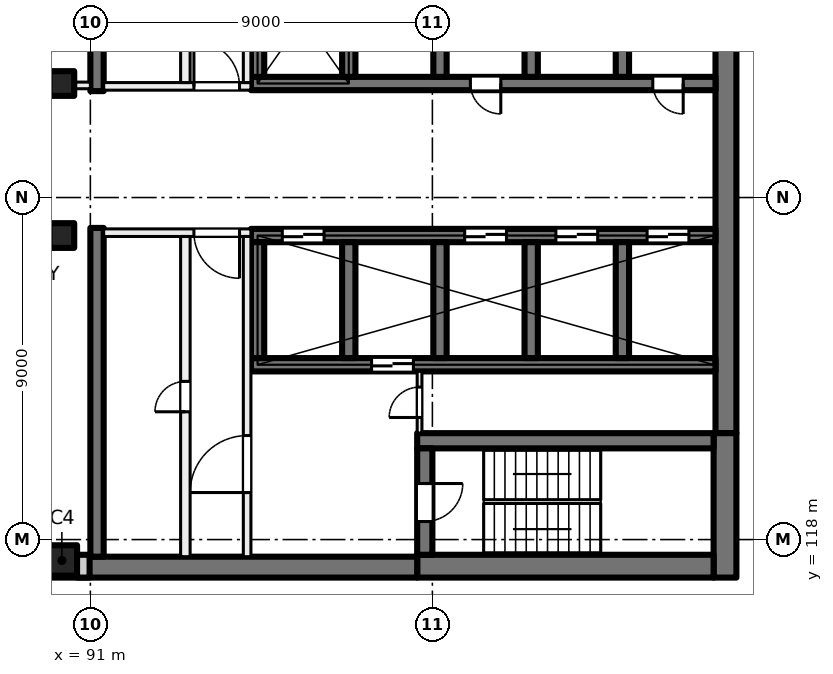
"""IFC4 building model, lengths in metres.
Left out: names, types, materials, properties, quantities, classifications, styles, units other than length and angle.
Written with IfcOpenShell. Run it as: python <this file> out.ifc"""

import sys

from ifc_helpers import new_model, si_unit, direction, frame, frame_2d, origin, origin_2d, place, context, subcontext, project, spatial, rectangle, extrude, element, fill, save


model = new_model("IFC4")
c1 = context("Model", 3, precision=1e-05, world=origin(), true_north=direction((0.0, 1.0)))
c2 = subcontext(c1, "Body", "Model", "MODEL_VIEW")
j1 = project(units=[si_unit("LENGTHUNIT", "METRE"), si_unit("PLANEANGLEUNIT", "RADIAN")], contexts=[c1])
p1 = place(None, origin())
s1 = spatial("IfcSite", under=j1, at=p1, CompositionType="ELEMENT")
p2 = place(p1, origin())
s2 = spatial("IfcBuilding", under=s1, at=p2, CompositionType="ELEMENT")
p3 = place(p2, frame((0.0, 0.0, 158.5)))
s3 = spatial("IfcBuildingStorey", under=s2, at=p3, CompositionType="ELEMENT", Elevation=158.5)
for number, where, z_axis, x_axis in (
    (1, (90.25, 130.0, 0.0), (0.0, 0.0, 1.0), (1.0, 0.0, 0.0)),
    (2, (90.25, 126.0, 0.0), (0.0, 0.0, 1.0), (1.0, 0.0, 0.0)),
):
    element("IfcColumn", number, at=place(p3, frame(where, z_axis=z_axis, x_axis=x_axis)), inside=s3, PredefinedType="COLUMN", context=c2, shape_type="SweptSolid", body=[
        extrude(rectangle(XDim=0.65, YDim=0.65, at=origin_2d()), origin(), (0.0, 0.0, 1.0), 4.0),
    ])
p4 = place(p3, frame((90.25, 117.45, 0.0), z_axis=(0.0, 0.0, 1.0), x_axis=(1.0, 0.0, 0.0)))
e3 = element("IfcColumn", 3, at=p4, inside=s3, PredefinedType="COLUMN", context=c2, shape_type="SweptSolid", body=[
    extrude(rectangle(XDim=0.8, YDim=0.8, at=origin_2d()), origin(), (0.0, 0.0, 1.0), 4.0),
])
p5 = place(p3, frame((107.725, 135.2, 0.0), z_axis=(0.0, 0.0, 1.0), x_axis=(0.0, -1.0, 0.0)))
e4 = element("IfcWall", 4, at=p5, inside=s3, PredefinedType="SHEAR", context=c2, shape_type="SweptSolid", body=[
    extrude(rectangle(XDim=14.4, YDim=0.55, at=frame_2d((7.2, 0.0))), origin(), (0.0, 0.0, 1.0), 4.0),
])
p6 = place(p3, frame((107.7, 120.8, 0.0), z_axis=(0.0, 0.0, 1.0), x_axis=(0.0, -1.0, 0.0)))
e5 = element("IfcWall", 5, at=p6, inside=s3, PredefinedType="SHEAR", context=c2, shape_type="SweptSolid", body=[
    extrude(rectangle(XDim=3.8, YDim=0.6, at=frame_2d((1.9, 0.0))), origin(), (0.0, 0.0, 1.0), 4.0),
])
p7 = place(p3, frame((107.4, 117.3, 0.0), z_axis=(0.0, 0.0, 1.0), x_axis=(-1.0, 0.0, 0.0)))
e6 = element("IfcWall", 6, at=p7, inside=s3, PredefinedType="SHEAR", context=c2, shape_type="SweptSolid", body=[
    extrude(rectangle(XDim=7.8, YDim=0.6, at=frame_2d((3.9, 0.0))), origin(), (0.0, 0.0, 1.0), 4.0),
])
p8 = place(p3, frame((99.6, 117.275, 0.0), z_axis=(0.0, 0.0, 1.0), x_axis=(-1.0, 0.0, 0.0)))
e7 = element("IfcWall", 7, at=p8, inside=s3, PredefinedType="SHEAR", context=c2, shape_type="SweptSolid", body=[
    extrude(rectangle(XDim=8.95, YDim=0.55, at=frame_2d((4.475, 0.0))), origin(), (0.0, 0.0, 1.0), 4.0),
])
p9 = place(p3, frame((107.4, 120.6, 0.0), z_axis=(0.0, 0.0, 1.0), x_axis=(-1.0, 0.0, 0.0)))
e8 = element("IfcWall", 8, at=p9, inside=s3, PredefinedType="SHEAR", context=c2, shape_type="SweptSolid", body=[
    extrude(rectangle(XDim=7.8, YDim=0.4, at=frame_2d((3.9, 0.0))), origin(), (0.0, 0.0, 1.0), 4.0),
])
p10 = place(p3, frame((99.8, 120.4, 0.0), z_axis=(0.0, 0.0, 1.0), x_axis=(0.0, -1.0, 0.0)))
e9 = element("IfcWall", 9, at=p10, inside=s3, PredefinedType="SHEAR", context=c2, shape_type="SweptSolid", body=[
    extrude(rectangle(XDim=2.8, YDim=0.4, at=frame_2d((1.4, 0.0))), origin(), (0.0, 0.0, 1.0), 4.0),
])
p11 = place(p10, frame((0.925, 0.0, 0.0)))
e10 = element("IfcOpeningElement", 10, at=p11, cuts=e9, PredefinedType="OPENING", context=c2, shape_type="SweptSolid", body=[
    extrude(rectangle(XDim=1.0, YDim=2.1, at=frame_2d((0.5, 1.05))), frame((0.0, 0.21, 0.0), z_axis=(0.0, -1.0, 0.0), x_axis=(1.0, 0.0, 0.0)), (0.0, 0.0, 1.0), 0.42),
])
p12 = place(p3, frame((107.45, 130.0, 0.0), z_axis=(0.0, 0.0, 1.0), x_axis=(-1.0, 0.0, 0.0)))
e11 = element("IfcWall", 11, at=p12, inside=s3, PredefinedType="SHEAR", context=c2, shape_type="SweptSolid", body=[
    extrude(rectangle(XDim=12.225, YDim=0.35, at=frame_2d((6.112, 0.0))), origin(), (0.0, 0.0, 1.0), 4.0),
])
p13 = place(p12, frame((0.85, 0.0, 0.0)))
e12 = element("IfcOpeningElement", 12, at=p13, cuts=e11, PredefinedType="OPENING", context=c2, shape_type="SweptSolid", body=[
    extrude(rectangle(XDim=0.8, YDim=2.1, at=frame_2d((0.4, 1.05))), frame((0.0, 0.185, 0.0), z_axis=(0.0, -1.0, 0.0), x_axis=(1.0, 0.0, 0.0)), (0.0, 0.0, 1.0), 0.37),
])
p14 = place(p12, frame((5.65, 0.0, 0.0)))
e13 = element("IfcOpeningElement", 13, at=p14, cuts=e11, PredefinedType="OPENING", context=c2, shape_type="SweptSolid", body=[
    extrude(rectangle(XDim=0.8, YDim=2.1, at=frame_2d((0.4, 1.05))), frame((0.0, 0.185, 0.0), z_axis=(0.0, -1.0, 0.0), x_axis=(1.0, 0.0, 0.0)), (0.0, 0.0, 1.0), 0.37),
])
for number, where, z_axis, x_axis in (
    (14, (105.0, 133.225, 0.0), (0.0, 0.0, 1.0), (0.0, -1.0, 0.0)),
    (15, (102.6, 133.225, 0.0), (0.0, 0.0, 1.0), (0.0, -1.0, 0.0)),
    (16, (100.2, 133.225, 0.0), (0.0, 0.0, 1.0), (0.0, -1.0, 0.0)),
    (17, (97.8, 133.225, 0.0), (0.0, 0.0, 1.0), (0.0, -1.0, 0.0)),
    (18, (95.4, 133.225, 0.0), (0.0, 0.0, 1.0), (0.0, -1.0, 0.0)),
):
    element("IfcWall", number, at=place(p3, frame(where, z_axis=z_axis, x_axis=x_axis)), inside=s3, PredefinedType="SHEAR", context=c2, shape_type="SweptSolid", body=[
        extrude(rectangle(XDim=3.05, YDim=0.35, at=frame_2d((1.525, 0.0))), origin(), (0.0, 0.0, 1.0), 4.0),
    ])
p15 = place(p3, frame((107.45, 126.0, 0.0), z_axis=(0.0, 0.0, 1.0), x_axis=(-1.0, 0.0, 0.0)))
e19 = element("IfcWall", 19, at=p15, inside=s3, PredefinedType="SHEAR", context=c2, shape_type="SweptSolid", body=[
    extrude(rectangle(XDim=12.225, YDim=0.35, at=frame_2d((6.112, 0.0))), origin(), (0.0, 0.0, 1.0), 4.0),
])
p16 = place(p15, frame((0.7, 0.0, 0.0)))
e20 = element("IfcOpeningElement", 20, at=p16, cuts=e19, PredefinedType="OPENING", context=c2, shape_type="SweptSolid", body=[
    extrude(rectangle(XDim=1.1, YDim=2.1, at=frame_2d((0.55, 1.05))), frame((0.0, 0.185, 0.0), z_axis=(0.0, -1.0, 0.0), x_axis=(1.0, 0.0, 0.0)), (0.0, 0.0, 1.0), 0.37),
])
p17 = place(p15, frame((3.1, 0.0, 0.0)))
e21 = element("IfcOpeningElement", 21, at=p17, cuts=e19, PredefinedType="OPENING", context=c2, shape_type="SweptSolid", body=[
    extrude(rectangle(XDim=1.1, YDim=2.1, at=frame_2d((0.55, 1.05))), frame((0.0, 0.185, 0.0), z_axis=(0.0, -1.0, 0.0), x_axis=(1.0, 0.0, 0.0)), (0.0, 0.0, 1.0), 0.37),
])
p18 = place(p15, frame((5.5, 0.0, 0.0)))
e22 = element("IfcOpeningElement", 22, at=p18, cuts=e19, PredefinedType="OPENING", context=c2, shape_type="SweptSolid", body=[
    extrude(rectangle(XDim=1.1, YDim=2.1, at=frame_2d((0.55, 1.05))), frame((0.0, 0.185, 0.0), z_axis=(0.0, -1.0, 0.0), x_axis=(1.0, 0.0, 0.0)), (0.0, 0.0, 1.0), 0.37),
])
p19 = place(p15, frame((10.3, 0.0, 0.0)))
e23 = element("IfcOpeningElement", 23, at=p19, cuts=e19, PredefinedType="OPENING", context=c2, shape_type="SweptSolid", body=[
    extrude(rectangle(XDim=1.1, YDim=2.1, at=frame_2d((0.55, 1.05))), frame((0.0, 0.185, 0.0), z_axis=(0.0, -1.0, 0.0), x_axis=(1.0, 0.0, 0.0)), (0.0, 0.0, 1.0), 0.37),
])
p20 = place(p3, frame((107.45, 122.6, 0.0), z_axis=(0.0, 0.0, 1.0), x_axis=(-1.0, 0.0, 0.0)))
e24 = element("IfcWall", 24, at=p20, inside=s3, PredefinedType="SHEAR", context=c2, shape_type="SweptSolid", body=[
    extrude(rectangle(XDim=12.225, YDim=0.35, at=frame_2d((6.112, 0.0))), origin(), (0.0, 0.0, 1.0), 4.0),
])
p21 = place(p20, frame((7.95, 0.0, 0.0)))
e25 = element("IfcOpeningElement", 25, at=p21, cuts=e24, PredefinedType="OPENING", context=c2, shape_type="SweptSolid", body=[
    extrude(rectangle(XDim=1.1, YDim=2.1, at=frame_2d((0.55, 1.05))), frame((0.0, 0.185, 0.0), z_axis=(0.0, -1.0, 0.0), x_axis=(1.0, 0.0, 0.0)), (0.0, 0.0, 1.0), 0.37),
])
for number, where, z_axis, x_axis in (
    (26, (105.0, 125.825, 0.0), (0.0, 0.0, 1.0), (0.0, -1.0, 0.0)),
    (27, (102.6, 125.825, 0.0), (0.0, 0.0, 1.0), (0.0, -1.0, 0.0)),
    (28, (100.2, 125.825, 0.0), (0.0, 0.0, 1.0), (0.0, -1.0, 0.0)),
    (29, (97.8, 125.825, 0.0), (0.0, 0.0, 1.0), (0.0, -1.0, 0.0)),
    (30, (95.4, 125.825, 0.0), (0.0, 0.0, 1.0), (0.0, -1.0, 0.0)),
):
    element("IfcWall", number, at=place(p3, frame(where, z_axis=z_axis, x_axis=x_axis)), inside=s3, PredefinedType="SHEAR", context=c2, shape_type="SweptSolid", body=[
        extrude(rectangle(XDim=3.05, YDim=0.35, at=frame_2d((1.525, 0.0))), origin(), (0.0, 0.0, 1.0), 4.0),
    ])
for number, where, z_axis, x_axis in (
    (31, (91.175, 138.45, 0.0), (0.0, 0.0, 1.0), (0.0, -1.0, 0.0)),
    (32, (91.175, 126.2, 0.0), (0.0, 0.0, 1.0), (0.0, -1.0, 0.0)),
):
    element("IfcWall", number, at=place(p3, frame(where, z_axis=z_axis, x_axis=x_axis)), inside=s3, PredefinedType="SHEAR", context=c2, shape_type="SweptSolid", body=[
        extrude(rectangle(XDim=8.65, YDim=0.35, at=frame_2d((4.325, 0.0))), origin(), (0.0, 0.0, 1.0), 4.0),
    ])
p22 = place(p3, frame((90.98, 117.3, 0.0), z_axis=(0.0, 0.0, 1.0), x_axis=(-1.0, 0.0, 0.0)))
e33 = element("IfcWall", 33, at=p22, inside=s3, PredefinedType="SOLIDWALL", context=c2, shape_type="SweptSolid", body=[
    extrude(rectangle(XDim=33.745, YDim=0.6, at=frame_2d((16.873, 0.0))), origin(), (0.0, 0.0, 1.0), 3.625),
])
p23 = place(p22, frame((1.48, 0.0, 0.9)))
e34 = element("IfcOpeningElement", 34, at=p23, cuts=e33, PredefinedType="OPENING", context=c2, shape_type="SweptSolid", body=[
    extrude(rectangle(XDim=3.0, YDim=2.4, at=frame_2d((1.5, 1.2))), frame((0.0, 0.31, 0.0), z_axis=(0.0, -1.0, 0.0), x_axis=(1.0, 0.0, 0.0)), (0.0, 0.0, 1.0), 0.62),
])
p24 = place(p22, frame((5.98, 0.0, 0.9)))
e35 = element("IfcOpeningElement", 35, at=p24, cuts=e33, PredefinedType="OPENING", context=c2, shape_type="SweptSolid", body=[
    extrude(rectangle(XDim=3.0, YDim=2.4, at=frame_2d((1.5, 1.2))), frame((0.0, 0.31, 0.0), z_axis=(0.0, -1.0, 0.0), x_axis=(1.0, 0.0, 0.0)), (0.0, 0.0, 1.0), 0.62),
])
p25 = place(p22, frame((10.48, 0.0, 0.9)))
e36 = element("IfcOpeningElement", 36, at=p25, cuts=e33, PredefinedType="OPENING", context=c2, shape_type="SweptSolid", body=[
    extrude(rectangle(XDim=3.0, YDim=2.4, at=frame_2d((1.5, 1.2))), frame((0.0, 0.31, 0.0), z_axis=(0.0, -1.0, 0.0), x_axis=(1.0, 0.0, 0.0)), (0.0, 0.0, 1.0), 0.62),
])
p26 = place(p22, frame((14.98, 0.0, 0.9)))
e37 = element("IfcOpeningElement", 37, at=p26, cuts=e33, PredefinedType="OPENING", context=c2, shape_type="SweptSolid", body=[
    extrude(rectangle(XDim=3.0, YDim=2.4, at=frame_2d((1.5, 1.2))), frame((0.0, 0.31, 0.0), z_axis=(0.0, -1.0, 0.0), x_axis=(1.0, 0.0, 0.0)), (0.0, 0.0, 1.0), 0.62),
])
p27 = place(p22, frame((19.48, 0.0, 0.9)))
e38 = element("IfcOpeningElement", 38, at=p27, cuts=e33, PredefinedType="OPENING", context=c2, shape_type="SweptSolid", body=[
    extrude(rectangle(XDim=3.0, YDim=2.4, at=frame_2d((1.5, 1.2))), frame((0.0, 0.31, 0.0), z_axis=(0.0, -1.0, 0.0), x_axis=(1.0, 0.0, 0.0)), (0.0, 0.0, 1.0), 0.62),
])
p28 = place(p22, frame((23.98, 0.0, 0.9)))
e39 = element("IfcOpeningElement", 39, at=p28, cuts=e33, PredefinedType="OPENING", context=c2, shape_type="SweptSolid", body=[
    extrude(rectangle(XDim=3.0, YDim=2.4, at=frame_2d((1.5, 1.2))), frame((0.0, 0.31, 0.0), z_axis=(0.0, -1.0, 0.0), x_axis=(1.0, 0.0, 0.0)), (0.0, 0.0, 1.0), 0.62),
])
p29 = place(p22, frame((28.48, 0.0, 0.9)))
e40 = element("IfcOpeningElement", 40, at=p29, cuts=e33, PredefinedType="OPENING", context=c2, shape_type="SweptSolid", body=[
    extrude(rectangle(XDim=3.0, YDim=2.4, at=frame_2d((1.5, 1.2))), frame((0.0, 0.31, 0.0), z_axis=(0.0, -1.0, 0.0), x_axis=(1.0, 0.0, 0.0)), (0.0, 0.0, 1.0), 0.62),
])
p30 = place(p3, frame((95.225, 126.075, 0.0), z_axis=(0.0, 0.0, 1.0), x_axis=(-1.0, 0.0, 0.0)))
e41 = element("IfcWall", 41, at=p30, inside=s3, PredefinedType="PARTITIONING", context=c2, shape_type="SweptSolid", body=[
    extrude(rectangle(XDim=3.875, YDim=0.2, at=frame_2d((1.938, 0.0))), origin(), (0.0, 0.0, 1.0), 3.625),
])
p31 = place(p30, frame((0.3, 0.0, 0.0)))
e42 = element("IfcOpeningElement", 42, at=p31, cuts=e41, PredefinedType="OPENING", context=c2, shape_type="SweptSolid", body=[
    extrude(rectangle(XDim=1.2, YDim=2.1, at=frame_2d((0.6, 1.05))), frame((0.0, 0.11, 0.0), z_axis=(0.0, -1.0, 0.0), x_axis=(1.0, 0.0, 0.0)), (0.0, 0.0, 1.0), 0.22),
])
p32 = place(p3, frame((95.125, 117.55, 0.0), z_axis=(0.0, 0.0, 1.0), x_axis=(0.0, 1.0, 0.0)))
e43 = element("IfcWall", 43, at=p32, inside=s3, PredefinedType="PARTITIONING", context=c2, shape_type="SweptSolid", body=[
    extrude(rectangle(XDim=8.425, YDim=0.2, at=frame_2d((4.212, 0.0))), origin(), (0.0, 0.0, 1.0), 3.625),
])
p33 = place(p32, frame((1.688, 0.0, 0.0)))
e44 = element("IfcOpeningElement", 44, at=p33, cuts=e43, PredefinedType="OPENING", context=c2, shape_type="SweptSolid", body=[
    extrude(rectangle(XDim=1.5, YDim=2.1, at=frame_2d((0.75, 1.05))), frame((0.0, 0.11, 0.0), z_axis=(0.0, -1.0, 0.0), x_axis=(1.0, 0.0, 0.0)), (0.0, 0.0, 1.0), 0.22),
])
p34 = place(p3, frame((93.5, 117.55, 0.0), z_axis=(0.0, 0.0, 1.0), x_axis=(0.0, 1.0, 0.0)))
e45 = element("IfcWall", 45, at=p34, inside=s3, PredefinedType="PARTITIONING", context=c2, shape_type="SweptSolid", body=[
    extrude(rectangle(XDim=8.425, YDim=0.25, at=frame_2d((4.212, 0.0))), origin(), (0.0, 0.0, 1.0), 3.625),
])
p35 = place(p34, frame((3.812, 0.0, 0.0)))
e46 = element("IfcOpeningElement", 46, at=p35, cuts=e45, PredefinedType="OPENING", context=c2, shape_type="SweptSolid", body=[
    extrude(rectangle(XDim=0.8, YDim=2.1, at=frame_2d((0.4, 1.05))), frame((0.0, 0.135, 0.0), z_axis=(0.0, -1.0, 0.0), x_axis=(1.0, 0.0, 0.0)), (0.0, 0.0, 1.0), 0.27),
])
p36 = place(p3, frame((99.663, 120.8, 0.0), z_axis=(0.0, 0.0, 1.0), x_axis=(0.0, 1.0, 0.0)))
e47 = element("IfcWall", 47, at=p36, inside=s3, PredefinedType="PARTITIONING", context=c2, shape_type="SweptSolid", body=[
    extrude(rectangle(XDim=1.625, YDim=0.125, at=frame_2d((0.812, 0.0))), origin(), (0.0, 0.0, 1.0), 3.625),
])
p37 = place(p36, frame((0.413, 0.0, 0.0)))
e48 = element("IfcOpeningElement", 48, at=p37, cuts=e47, PredefinedType="OPENING", context=c2, shape_type="SweptSolid", body=[
    extrude(rectangle(XDim=0.8, YDim=2.1, at=frame_2d((0.4, 1.05))), frame((0.0, 0.073, 0.0), z_axis=(0.0, -1.0, 0.0), x_axis=(1.0, 0.0, 0.0)), (0.0, 0.0, 1.0), 0.145),
])
p38 = place(p3, frame((91.35, 129.925, 0.0), z_axis=(0.0, 0.0, 1.0), x_axis=(1.0, 0.0, 0.0)))
e49 = element("IfcWall", 49, at=p38, inside=s3, PredefinedType="PARTITIONING", context=c2, shape_type="SweptSolid", body=[
    extrude(rectangle(XDim=3.875, YDim=0.2, at=frame_2d((1.938, 0.0))), origin(), (0.0, 0.0, 1.0), 3.625),
])
p39 = place(p38, frame((2.375, 0.0, 0.0)))
e50 = element("IfcOpeningElement", 50, at=p39, cuts=e49, PredefinedType="OPENING", context=c2, shape_type="SweptSolid", body=[
    extrude(rectangle(XDim=1.2, YDim=2.1, at=frame_2d((0.6, 1.05))), frame((0.0, 0.11, 0.0), z_axis=(0.0, -1.0, 0.0), x_axis=(1.0, 0.0, 0.0)), (0.0, 0.0, 1.0), 0.22),
])
p40 = place(p3, frame((95.125, 130.025, 0.0), z_axis=(0.0, 0.0, 1.0), x_axis=(0.0, 1.0, 0.0)))
e51 = element("IfcWall", 51, at=p40, inside=s3, PredefinedType="PARTITIONING", context=c2, shape_type="SweptSolid", body=[
    extrude(rectangle(XDim=8.425, YDim=0.2, at=frame_2d((4.212, 0.0))), origin(), (0.0, 0.0, 1.0), 3.625),
])
p41 = place(p40, frame((5.238, 0.0, 0.0)))
e52 = element("IfcOpeningElement", 52, at=p41, cuts=e51, PredefinedType="OPENING", context=c2, shape_type="SweptSolid", body=[
    extrude(rectangle(XDim=1.5, YDim=2.1, at=frame_2d((0.75, 1.05))), frame((0.0, 0.11, 0.0), z_axis=(0.0, -1.0, 0.0), x_axis=(1.0, 0.0, 0.0)), (0.0, 0.0, 1.0), 0.22),
])
p42 = place(p3, frame((93.5, 130.025, 0.0), z_axis=(0.0, 0.0, 1.0), x_axis=(0.0, 1.0, 0.0)))
e53 = element("IfcWall", 53, at=p42, inside=s3, PredefinedType="PARTITIONING", context=c2, shape_type="SweptSolid", body=[
    extrude(rectangle(XDim=8.425, YDim=0.25, at=frame_2d((4.212, 0.0))), origin(), (0.0, 0.0, 1.0), 3.625),
])
p43 = place(p42, frame((2.282, 0.0, 0.0)))
e54 = element("IfcOpeningElement", 54, at=p43, cuts=e53, PredefinedType="OPENING", context=c2, shape_type="SweptSolid", body=[
    extrude(rectangle(XDim=1.0, YDim=2.1, at=frame_2d((0.5, 1.05))), frame((0.0, 0.135, 0.0), z_axis=(0.0, -1.0, 0.0), x_axis=(1.0, 0.0, 0.0)), (0.0, 0.0, 1.0), 0.27),
])
p44 = place(p42, frame((6.545, 0.0, 0.0)))
e55 = element("IfcOpeningElement", 55, at=p44, cuts=e53, PredefinedType="OPENING", context=c2, shape_type="SweptSolid", body=[
    extrude(rectangle(XDim=1.0, YDim=2.1, at=frame_2d((0.5, 1.05))), frame((0.0, 0.135, 0.0), z_axis=(0.0, -1.0, 0.0), x_axis=(1.0, 0.0, 0.0)), (0.0, 0.0, 1.0), 0.27),
])
p45 = place(p3, frame((85.838, 129.95, 0.0), z_axis=(0.0, 0.0, 1.0), x_axis=(1.0, 0.0, 0.0)))
e56 = element("IfcWall", 56, at=p45, inside=s3, PredefinedType="PARTITIONING", context=c2, shape_type="SweptSolid", body=[
    extrude(rectangle(XDim=5.162, YDim=0.175, at=frame_2d((2.581, 0.0))), origin(), (0.0, 0.0, 1.0), 3.625),
])
p46 = place(p45, frame((1.971, 0.0, 0.0)))
e57 = element("IfcOpeningElement", 57, at=p46, cuts=e56, PredefinedType="OPENING", context=c2, shape_type="SweptSolid", body=[
    extrude(rectangle(XDim=1.2, YDim=2.1, at=frame_2d((0.6, 1.05))), frame((0.0, 0.097, 0.0), z_axis=(0.0, -1.0, 0.0), x_axis=(1.0, 0.0, 0.0)), (0.0, 0.0, 1.0), 0.195),
])
p47 = place(p16, origin())
e58 = element("IfcDoor", 58, at=p47, inside=s3, OperationType="DOUBLE_DOOR_SLIDING", PredefinedType="DOOR", context=c2, shape_type="SweptSolid", body=[
    extrude(rectangle(XDim=1.1, YDim=2.1, at=frame_2d((0.55, 1.05))), frame((0.0, 0.025, 0.0), z_axis=(0.0, -1.0, 0.0), x_axis=(1.0, 0.0, 0.0)), (0.0, 0.0, 1.0), 0.05),
])
fill(e20, e58)
p48 = place(p17, origin())
e59 = element("IfcDoor", 59, at=p48, inside=s3, OperationType="DOUBLE_DOOR_SLIDING", PredefinedType="DOOR", context=c2, shape_type="SweptSolid", body=[
    extrude(rectangle(XDim=1.1, YDim=2.1, at=frame_2d((0.55, 1.05))), frame((0.0, 0.025, 0.0), z_axis=(0.0, -1.0, 0.0), x_axis=(1.0, 0.0, 0.0)), (0.0, 0.0, 1.0), 0.05),
])
fill(e21, e59)
p49 = place(p18, origin())
e60 = element("IfcDoor", 60, at=p49, inside=s3, OperationType="DOUBLE_DOOR_SLIDING", PredefinedType="DOOR", context=c2, shape_type="SweptSolid", body=[
    extrude(rectangle(XDim=1.1, YDim=2.1, at=frame_2d((0.55, 1.05))), frame((0.0, 0.025, 0.0), z_axis=(0.0, -1.0, 0.0), x_axis=(1.0, 0.0, 0.0)), (0.0, 0.0, 1.0), 0.05),
])
fill(e22, e60)
p50 = place(p19, origin())
e61 = element("IfcDoor", 61, at=p50, inside=s3, OperationType="DOUBLE_DOOR_SLIDING", PredefinedType="DOOR", context=c2, shape_type="SweptSolid", body=[
    extrude(rectangle(XDim=1.1, YDim=2.1, at=frame_2d((0.55, 1.05))), frame((0.0, 0.025, 0.0), z_axis=(0.0, -1.0, 0.0), x_axis=(1.0, 0.0, 0.0)), (0.0, 0.0, 1.0), 0.05),
])
fill(e23, e61)
p51 = place(p13, origin())
e62 = element("IfcDoor", 62, at=p51, inside=s3, OperationType="SINGLE_SWING_LEFT", PredefinedType="DOOR", context=c2, shape_type="SweptSolid", body=[
    extrude(rectangle(XDim=0.8, YDim=2.1, at=frame_2d((0.4, 1.05))), frame((0.0, 0.025, 0.0), z_axis=(0.0, -1.0, 0.0), x_axis=(1.0, 0.0, 0.0)), (0.0, 0.0, 1.0), 0.05),
])
fill(e12, e62)
p52 = place(p14, origin())
e63 = element("IfcDoor", 63, at=p52, inside=s3, OperationType="SINGLE_SWING_RIGHT", PredefinedType="DOOR", context=c2, shape_type="SweptSolid", body=[
    extrude(rectangle(XDim=0.8, YDim=2.1, at=frame_2d((0.4, 1.05))), frame((0.0, 0.025, 0.0), z_axis=(0.0, -1.0, 0.0), x_axis=(1.0, 0.0, 0.0)), (0.0, 0.0, 1.0), 0.05),
])
fill(e13, e63)
p53 = place(p31, origin())
e64 = element("IfcDoor", 64, at=p53, inside=s3, OperationType="DOUBLE_DOOR_SINGLE_SWING", PredefinedType="DOOR", context=c2, shape_type="SweptSolid", body=[
    extrude(rectangle(XDim=1.2, YDim=2.1, at=frame_2d((0.6, 1.05))), frame((0.0, 0.025, 0.0), z_axis=(0.0, -1.0, 0.0), x_axis=(1.0, 0.0, 0.0)), (0.0, 0.0, 1.0), 0.05),
])
fill(e42, e64)
p54 = place(p33, origin())
e65 = element("IfcDoor", 65, at=p54, inside=s3, OperationType="DOUBLE_DOOR_SINGLE_SWING", PredefinedType="DOOR", context=c2, shape_type="SweptSolid", body=[
    extrude(rectangle(XDim=1.5, YDim=2.1, at=frame_2d((0.75, 1.05))), frame((0.0, 0.025, 0.0), z_axis=(0.0, -1.0, 0.0), x_axis=(1.0, 0.0, 0.0)), (0.0, 0.0, 1.0), 0.05),
])
fill(e44, e65)
p55 = place(p11, origin())
e66 = element("IfcDoor", 66, at=p55, inside=s3, OperationType="SINGLE_SWING_LEFT", PredefinedType="DOOR", context=c2, shape_type="SweptSolid", body=[
    extrude(rectangle(XDim=1.0, YDim=2.1, at=frame_2d((0.5, 1.05))), frame((0.0, 0.025, 0.0), z_axis=(0.0, -1.0, 0.0), x_axis=(1.0, 0.0, 0.0)), (0.0, 0.0, 1.0), 0.05),
])
fill(e10, e66)
p56 = place(p37, origin())
e67 = element("IfcDoor", 67, at=p56, inside=s3, OperationType="SINGLE_SWING_RIGHT", PredefinedType="DOOR", context=c2, shape_type="SweptSolid", body=[
    extrude(rectangle(XDim=0.8, YDim=2.1, at=frame_2d((0.4, 1.05))), frame((0.0, 0.025, 0.0), z_axis=(0.0, -1.0, 0.0), x_axis=(1.0, 0.0, 0.0)), (0.0, 0.0, 1.0), 0.05),
])
fill(e48, e67)
p57 = place(p35, origin())
e68 = element("IfcDoor", 68, at=p57, inside=s3, OperationType="SINGLE_SWING_LEFT", PredefinedType="DOOR", context=c2, shape_type="SweptSolid", body=[
    extrude(rectangle(XDim=0.8, YDim=2.1, at=frame_2d((0.4, 1.05))), frame((0.0, 0.025, 0.0), z_axis=(0.0, -1.0, 0.0), x_axis=(1.0, 0.0, 0.0)), (0.0, 0.0, 1.0), 0.05),
])
fill(e46, e68)
p58 = place(p39, origin())
e69 = element("IfcDoor", 69, at=p58, inside=s3, OperationType="DOUBLE_DOOR_SINGLE_SWING", PredefinedType="DOOR", context=c2, shape_type="SweptSolid", body=[
    extrude(rectangle(XDim=1.2, YDim=2.1, at=frame_2d((0.6, 1.05))), frame((0.0, 0.025, 0.0), z_axis=(0.0, -1.0, 0.0), x_axis=(1.0, 0.0, 0.0)), (0.0, 0.0, 1.0), 0.05),
])
fill(e50, e69)
p59 = place(p21, origin())
e70 = element("IfcDoor", 70, at=p59, inside=s3, OperationType="DOUBLE_DOOR_SLIDING", PredefinedType="DOOR", context=c2, shape_type="SweptSolid", body=[
    extrude(rectangle(XDim=1.1, YDim=2.1, at=frame_2d((0.55, 1.05))), frame((0.0, 0.025, 0.0), z_axis=(0.0, -1.0, 0.0), x_axis=(1.0, 0.0, 0.0)), (0.0, 0.0, 1.0), 0.05),
])
fill(e25, e70)
save(model, sys.argv[1])
